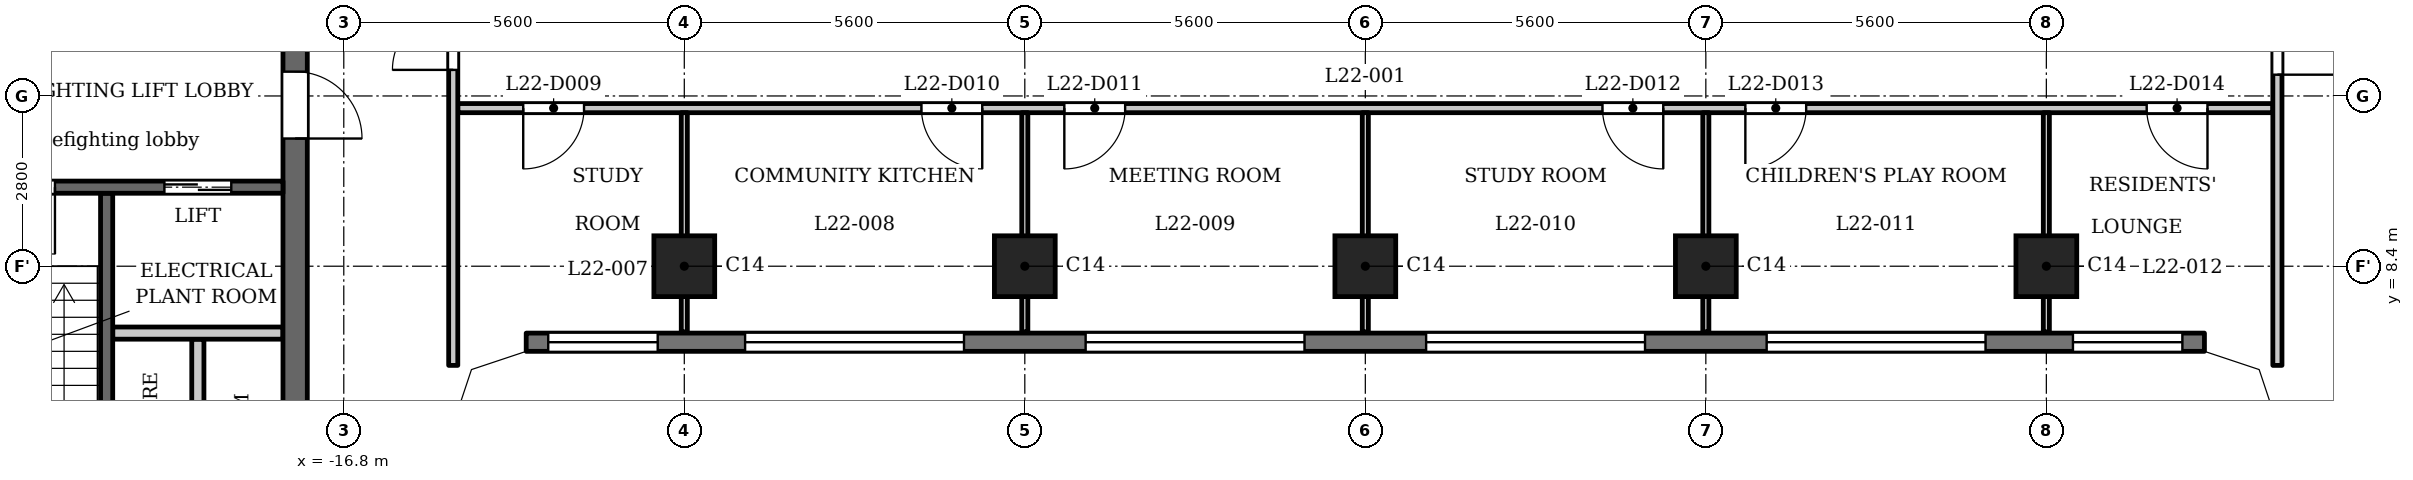
"""IFC4 building model, lengths in metres.
Left out: names, types, materials, properties, quantities, classifications, styles, units other than length and angle.
Written with IfcOpenShell. Run it as: python <this file> out.ifc"""

import sys

from ifc_helpers import new_model, si_unit, direction, frame, frame_2d, origin, origin_2d, place, context, subcontext, project, spatial, polyline, rectangle, outline, extrude, element, fill, save


model = new_model("IFC4")
c1 = context("Model", 3, precision=1e-05, world=origin(), true_north=direction((0.0, 1.0)))
c2 = subcontext(c1, "Body", "Model", "MODEL_VIEW")
j1 = project(units=[si_unit("LENGTHUNIT", "METRE"), si_unit("PLANEANGLEUNIT", "RADIAN")], contexts=[c1])
p1 = place(None, origin())
s1 = spatial("IfcSite", under=j1, at=p1, CompositionType="ELEMENT")
p2 = place(p1, origin())
s2 = spatial("IfcBuilding", under=s1, at=p2, CompositionType="ELEMENT")
p3 = place(p2, frame((0.0, 0.0, 90.3)))
s3 = spatial("IfcBuildingStorey", under=s2, at=p3, CompositionType="ELEMENT", Elevation=90.3)
for number, where, z_axis, x_axis in (
    (1, (-11.2, 8.4, 0.0), (0.0, 0.0, 1.0), (1.0, 0.0, 0.0)),
    (2, (-5.6, 8.4, 0.0), (0.0, 0.0, 1.0), (1.0, 0.0, 0.0)),
    (3, (0.0, 8.4, 0.0), (0.0, 0.0, 1.0), (1.0, 0.0, 0.0)),
    (4, (5.6, 8.4, 0.0), (0.0, 0.0, 1.0), (1.0, 0.0, 0.0)),
    (5, (11.2, 8.4, 0.0), (0.0, 0.0, 1.0), (1.0, 0.0, 0.0)),
):
    element("IfcColumn", number, at=place(p3, frame(where, z_axis=z_axis, x_axis=x_axis)), inside=s3, PredefinedType="COLUMN", context=c2, shape_type="SweptSolid", body=[
        extrude(rectangle(XDim=1.0, YDim=1.0, at=origin_2d()), origin(), (0.0, 0.0, 1.0), 3.5),
    ])
p4 = place(p3, frame((-13.8, 7.15, 0.0), z_axis=(0.0, 0.0, 1.0), x_axis=(1.0, 0.0, 0.0)))
e6 = element("IfcWall", 6, at=p4, inside=s3, PredefinedType="SOLIDWALL", context=c2, shape_type="SweptSolid", body=[
    extrude(rectangle(XDim=27.6, YDim=0.3, at=frame_2d((13.8, 0.0))), origin(), (0.0, 0.0, 1.0), 3.2),
])
p5 = place(p4, frame((0.363, 0.0, 0.9)))
e7 = element("IfcOpeningElement", 7, at=p5, cuts=e6, PredefinedType="OPENING", context=c2, shape_type="SweptSolid", body=[
    extrude(rectangle(XDim=1.8, YDim=1.25, at=frame_2d((0.9, 0.625))), frame((0.0, 0.16, 0.0), z_axis=(0.0, -1.0, 0.0), x_axis=(1.0, 0.0, 0.0)), (0.0, 0.0, 1.0), 0.32),
])
p6 = place(p4, frame((3.6, 0.0, 1.2)))
e8 = element("IfcOpeningElement", 8, at=p6, cuts=e6, PredefinedType="OPENING", context=c2, shape_type="SweptSolid", body=[
    extrude(rectangle(XDim=3.6, YDim=0.95, at=frame_2d((1.8, 0.475))), frame((0.0, 0.16, 0.0), z_axis=(0.0, -1.0, 0.0), x_axis=(1.0, 0.0, 0.0)), (0.0, 0.0, 1.0), 0.32),
])
p7 = place(p4, frame((9.2, 0.0, 1.2)))
e9 = element("IfcOpeningElement", 9, at=p7, cuts=e6, PredefinedType="OPENING", context=c2, shape_type="SweptSolid", body=[
    extrude(rectangle(XDim=3.6, YDim=0.95, at=frame_2d((1.8, 0.475))), frame((0.0, 0.16, 0.0), z_axis=(0.0, -1.0, 0.0), x_axis=(1.0, 0.0, 0.0)), (0.0, 0.0, 1.0), 0.32),
])
p8 = place(p4, frame((14.8, 0.0, 1.2)))
e10 = element("IfcOpeningElement", 10, at=p8, cuts=e6, PredefinedType="OPENING", context=c2, shape_type="SweptSolid", body=[
    extrude(rectangle(XDim=3.6, YDim=0.95, at=frame_2d((1.8, 0.475))), frame((0.0, 0.16, 0.0), z_axis=(0.0, -1.0, 0.0), x_axis=(1.0, 0.0, 0.0)), (0.0, 0.0, 1.0), 0.32),
])
p9 = place(p4, frame((20.4, 0.0, 1.2)))
e11 = element("IfcOpeningElement", 11, at=p9, cuts=e6, PredefinedType="OPENING", context=c2, shape_type="SweptSolid", body=[
    extrude(rectangle(XDim=3.6, YDim=0.95, at=frame_2d((1.8, 0.475))), frame((0.0, 0.16, 0.0), z_axis=(0.0, -1.0, 0.0), x_axis=(1.0, 0.0, 0.0)), (0.0, 0.0, 1.0), 0.32),
])
p10 = place(p4, frame((25.438, 0.0, 0.9)))
e12 = element("IfcOpeningElement", 12, at=p10, cuts=e6, PredefinedType="OPENING", context=c2, shape_type="SweptSolid", body=[
    extrude(rectangle(XDim=1.8, YDim=1.25, at=frame_2d((0.9, 0.625))), frame((0.0, 0.16, 0.0), z_axis=(0.0, -1.0, 0.0), x_axis=(1.0, 0.0, 0.0)), (0.0, 0.0, 1.0), 0.32),
])
p11 = place(p3, frame((-20.7, 2.6, 0.0), z_axis=(0.0, 0.0, 1.0), x_axis=(0.0, 1.0, 0.0)))
e13 = element("IfcWall", 13, at=p11, inside=s3, PredefinedType="SHEAR", context=c2, shape_type="SweptSolid", body=[
    extrude(rectangle(XDim=7.0, YDim=0.2, at=frame_2d((3.5, 0.0))), origin(), (0.0, 0.0, 1.0), 3.2),
])
p12 = place(p3, frame((-19.2, 2.6, 0.0), z_axis=(0.0, 0.0, 1.0), x_axis=(0.0, 1.0, 0.0)))
e14 = element("IfcWall", 14, at=p12, inside=s3, PredefinedType="PARTITIONING", context=c2, shape_type="SweptSolid", body=[
    extrude(rectangle(XDim=4.6, YDim=0.2, at=frame_2d((2.3, 0.0))), origin(), (0.0, 0.0, 1.0), 3.2),
])
p13 = place(p3, frame((-17.6, -12.3, 0.0), z_axis=(0.0, 0.0, 1.0), x_axis=(0.0, 1.0, 0.0)))
e15 = element("IfcWall", 15, at=p13, inside=s3, PredefinedType="SHEAR", context=c2, shape_type="SweptSolid", body=[
    extrude(rectangle(XDim=24.6, YDim=0.4, at=frame_2d((12.3, 0.0))), origin(), (0.0, 0.0, 1.0), 3.2),
])
p14 = place(p13, frame((6.0, 0.0, 0.0)))
e16 = element("IfcOpeningElement", 16, at=p14, cuts=e15, PredefinedType="OPENING", context=c2, shape_type="SweptSolid", body=[
    extrude(rectangle(XDim=1.1, YDim=2.1, at=frame_2d((0.55, 1.05))), frame((0.0, 0.21, 0.0), z_axis=(0.0, -1.0, 0.0), x_axis=(1.0, 0.0, 0.0)), (0.0, 0.0, 1.0), 0.42),
])
p15 = place(p13, frame((8.4, 0.0, 0.0)))
e17 = element("IfcOpeningElement", 17, at=p15, cuts=e15, PredefinedType="OPENING", context=c2, shape_type="SweptSolid", body=[
    extrude(rectangle(XDim=1.1, YDim=2.1, at=frame_2d((0.55, 1.05))), frame((0.0, 0.21, 0.0), z_axis=(0.0, -1.0, 0.0), x_axis=(1.0, 0.0, 0.0)), (0.0, 0.0, 1.0), 0.42),
])
p16 = place(p13, frame((10.8, 0.0, 0.0)))
e18 = element("IfcOpeningElement", 18, at=p16, cuts=e15, PredefinedType="OPENING", context=c2, shape_type="SweptSolid", body=[
    extrude(rectangle(XDim=1.1, YDim=2.1, at=frame_2d((0.55, 1.05))), frame((0.0, 0.21, 0.0), z_axis=(0.0, -1.0, 0.0), x_axis=(1.0, 0.0, 0.0)), (0.0, 0.0, 1.0), 0.42),
])
p17 = place(p13, frame((16.75, 0.0, 0.0)))
e19 = element("IfcOpeningElement", 19, at=p17, cuts=e15, PredefinedType="OPENING", context=c2, shape_type="SweptSolid", body=[
    extrude(rectangle(XDim=0.9, YDim=2.1, at=frame_2d((0.45, 1.05))), frame((0.0, 0.21, 0.0), z_axis=(0.0, -1.0, 0.0), x_axis=(1.0, 0.0, 0.0)), (0.0, 0.0, 1.0), 0.42),
])
p18 = place(p13, frame((22.8, 0.0, 0.0)))
e20 = element("IfcOpeningElement", 20, at=p18, cuts=e15, PredefinedType="OPENING", context=c2, shape_type="SweptSolid", body=[
    extrude(rectangle(XDim=1.1, YDim=2.1, at=frame_2d((0.55, 1.05))), frame((0.0, 0.21, 0.0), z_axis=(0.0, -1.0, 0.0), x_axis=(1.0, 0.0, 0.0)), (0.0, 0.0, 1.0), 0.42),
])
p19 = place(p13, frame((0.7, 0.0, 0.0)))
e21 = element("IfcOpeningElement", 21, at=p19, cuts=e15, PredefinedType="OPENING", context=c2, shape_type="SweptSolid", body=[
    extrude(rectangle(XDim=1.1, YDim=2.1, at=frame_2d((0.55, 1.05))), frame((0.0, 0.21, 0.0), z_axis=(0.0, -1.0, 0.0), x_axis=(1.0, 0.0, 0.0)), (0.0, 0.0, 1.0), 0.42),
])
p20 = place(p13, frame((12.775, 0.0, 0.0)))
e22 = element("IfcOpeningElement", 22, at=p20, cuts=e15, PredefinedType="OPENING", context=c2, shape_type="SweptSolid", body=[
    extrude(rectangle(XDim=1.8, YDim=2.1, at=frame_2d((0.9, 1.05))), frame((0.0, 0.21, 0.0), z_axis=(0.0, -1.0, 0.0), x_axis=(1.0, 0.0, 0.0)), (0.0, 0.0, 1.0), 0.42),
])
p21 = place(p3, frame((-17.8, 7.3, 0.0), z_axis=(0.0, 0.0, 1.0), x_axis=(-1.0, 0.0, 0.0)))
e23 = element("IfcWall", 23, at=p21, inside=s3, PredefinedType="PARTITIONING", context=c2, shape_type="SweptSolid", body=[
    extrude(rectangle(XDim=2.8, YDim=0.2, at=frame_2d((1.4, 0.0))), origin(), (0.0, 0.0, 1.0), 3.2),
])
p22 = place(p3, frame((-17.8, 9.7, 0.0), z_axis=(0.0, 0.0, 1.0), x_axis=(-1.0, 0.0, 0.0)))
e24 = element("IfcWall", 24, at=p22, inside=s3, PredefinedType="SHEAR", context=c2, shape_type="SweptSolid", body=[
    extrude(rectangle(XDim=8.3, YDim=0.2, at=frame_2d((4.15, 0.0))), origin(), (0.0, 0.0, 1.0), 3.2),
])
p23 = place(p22, frame((0.85, 0.0, 0.0)))
e25 = element("IfcOpeningElement", 25, at=p23, cuts=e24, PredefinedType="OPENING", context=c2, shape_type="SweptSolid", body=[
    extrude(rectangle(XDim=1.1, YDim=2.1, at=frame_2d((0.55, 1.05))), frame((0.0, 0.11, 0.0), z_axis=(0.0, -1.0, 0.0), x_axis=(1.0, 0.0, 0.0)), (0.0, 0.0, 1.0), 0.22),
])
p24 = place(p22, frame((3.75, 0.0, 0.0)))
e26 = element("IfcOpeningElement", 26, at=p24, cuts=e24, PredefinedType="OPENING", context=c2, shape_type="SweptSolid", body=[
    extrude(rectangle(XDim=1.1, YDim=2.1, at=frame_2d((0.55, 1.05))), frame((0.0, 0.11, 0.0), z_axis=(0.0, -1.0, 0.0), x_axis=(1.0, 0.0, 0.0)), (0.0, 0.0, 1.0), 0.22),
])
p25 = place(p3, frame((-14.925, 11.0, 0.0), z_axis=(0.0, 0.0, 1.0), x_axis=(1.0, 0.0, 0.0)))
e27 = element("IfcWall", 27, at=p25, inside=s3, PredefinedType="PARTITIONING", context=c2, shape_type="SweptSolid", body=[
    extrude(rectangle(XDim=29.85, YDim=0.15, at=frame_2d((14.925, 0.0))), origin(), (0.0, 0.0, 1.0), 3.2),
])
p26 = place(p25, frame((1.076, 0.0, 0.0)))
e28 = element("IfcOpeningElement", 28, at=p26, cuts=e27, PredefinedType="OPENING", context=c2, shape_type="SweptSolid", body=[
    extrude(rectangle(XDim=1.0, YDim=2.1, at=frame_2d((0.5, 1.05))), frame((0.0, 0.085, 0.0), z_axis=(0.0, -1.0, 0.0), x_axis=(1.0, 0.0, 0.0)), (0.0, 0.0, 1.0), 0.17),
])
p27 = place(p25, frame((7.625, 0.0, 0.0)))
e29 = element("IfcOpeningElement", 29, at=p27, cuts=e27, PredefinedType="OPENING", context=c2, shape_type="SweptSolid", body=[
    extrude(rectangle(XDim=1.0, YDim=2.1, at=frame_2d((0.5, 1.05))), frame((0.0, 0.085, 0.0), z_axis=(0.0, -1.0, 0.0), x_axis=(1.0, 0.0, 0.0)), (0.0, 0.0, 1.0), 0.17),
])
p28 = place(p25, frame((9.975, 0.0, 0.0)))
e30 = element("IfcOpeningElement", 30, at=p28, cuts=e27, PredefinedType="OPENING", context=c2, shape_type="SweptSolid", body=[
    extrude(rectangle(XDim=1.0, YDim=2.1, at=frame_2d((0.5, 1.05))), frame((0.0, 0.085, 0.0), z_axis=(0.0, -1.0, 0.0), x_axis=(1.0, 0.0, 0.0)), (0.0, 0.0, 1.0), 0.17),
])
p29 = place(p25, frame((18.825, 0.0, 0.0)))
e31 = element("IfcOpeningElement", 31, at=p29, cuts=e27, PredefinedType="OPENING", context=c2, shape_type="SweptSolid", body=[
    extrude(rectangle(XDim=1.0, YDim=2.1, at=frame_2d((0.5, 1.05))), frame((0.0, 0.085, 0.0), z_axis=(0.0, -1.0, 0.0), x_axis=(1.0, 0.0, 0.0)), (0.0, 0.0, 1.0), 0.17),
])
p30 = place(p25, frame((21.175, 0.0, 0.0)))
e32 = element("IfcOpeningElement", 32, at=p30, cuts=e27, PredefinedType="OPENING", context=c2, shape_type="SweptSolid", body=[
    extrude(rectangle(XDim=1.0, YDim=2.1, at=frame_2d((0.5, 1.05))), frame((0.0, 0.085, 0.0), z_axis=(0.0, -1.0, 0.0), x_axis=(1.0, 0.0, 0.0)), (0.0, 0.0, 1.0), 0.17),
])
p31 = place(p25, frame((27.775, 0.0, 0.0)))
e33 = element("IfcOpeningElement", 33, at=p31, cuts=e27, PredefinedType="OPENING", context=c2, shape_type="SweptSolid", body=[
    extrude(rectangle(XDim=1.0, YDim=2.1, at=frame_2d((0.5, 1.05))), frame((0.0, 0.085, 0.0), z_axis=(0.0, -1.0, 0.0), x_axis=(1.0, 0.0, 0.0)), (0.0, 0.0, 1.0), 0.17),
])
p32 = place(p3, frame((-15.0, 6.769, 0.0), z_axis=(0.0, 0.0, 1.0), x_axis=(0.0, 1.0, 0.0)))
e34 = element("IfcWall", 34, at=p32, inside=s3, PredefinedType="PARTITIONING", context=c2, shape_type="SweptSolid", body=[
    extrude(rectangle(XDim=6.356, YDim=0.15, at=frame_2d((3.178, 0.0))), origin(), (0.0, 0.0, 1.0), 3.2),
])
p33 = place(p32, frame((4.86, 0.0, 0.0)))
e35 = element("IfcOpeningElement", 35, at=p33, cuts=e34, PredefinedType="OPENING", context=c2, shape_type="SweptSolid", body=[
    extrude(rectangle(XDim=1.0, YDim=2.1, at=frame_2d((0.5, 1.05))), frame((0.0, 0.085, 0.0), z_axis=(0.0, -1.0, 0.0), x_axis=(1.0, 0.0, 0.0)), (0.0, 0.0, 1.0), 0.17),
])
for number, where, z_axis, x_axis in (
    (36, (-11.2, 7.32, 0.0), (0.0, 0.0, 1.0), (0.0, 1.0, 0.0)),
    (37, (-5.6, 7.32, 0.0), (0.0, 0.0, 1.0), (0.0, 1.0, 0.0)),
    (38, (0.0, 7.32, 0.0), (0.0, 0.0, 1.0), (0.0, 1.0, 0.0)),
    (39, (5.6, 7.32, 0.0), (0.0, 0.0, 1.0), (0.0, 1.0, 0.0)),
    (40, (11.2, 7.32, 0.0), (0.0, 0.0, 1.0), (0.0, 1.0, 0.0)),
):
    element("IfcWall", number, at=place(p3, frame(where, z_axis=z_axis, x_axis=x_axis)), inside=s3, PredefinedType="PARTITIONING", context=c2, shape_type="SweptSolid", body=[
        extrude(rectangle(XDim=3.605, YDim=0.1, at=frame_2d((1.802, 0.0))), origin(), (0.0, 0.0, 1.0), 3.2),
    ])
p34 = place(p3, frame((15.0, 6.769, 0.0), z_axis=(0.0, 0.0, 1.0), x_axis=(0.0, 1.0, 0.0)))
e41 = element("IfcWall", 41, at=p34, inside=s3, PredefinedType="PARTITIONING", context=c2, shape_type="SweptSolid", body=[
    extrude(rectangle(XDim=6.356, YDim=0.15, at=frame_2d((3.178, 0.0))), origin(), (0.0, 0.0, 1.0), 3.2),
])
p35 = place(p34, frame((4.781, 0.0, 0.0)))
e42 = element("IfcOpeningElement", 42, at=p35, cuts=e41, PredefinedType="OPENING", context=c2, shape_type="SweptSolid", body=[
    extrude(rectangle(XDim=1.0, YDim=2.1, at=frame_2d((0.5, 1.05))), frame((0.0, 0.085, 0.0), z_axis=(0.0, -1.0, 0.0), x_axis=(1.0, 0.0, 0.0)), (0.0, 0.0, 1.0), 0.17),
])
p36 = place(p3, origin())
e43 = element("IfcWall", 43, at=p36, inside=s3, PredefinedType="SOLIDWALL", context=c2, shape_type="SweptSolid", body=[
    extrude(outline(polyline([(-13.849, 7.3), (-14.937, 6.937), (-15.3, 5.849), (-15.3, 5.8), (-15.0, 5.8), (-14.7, 6.7), (-13.8, 7.0), (-13.8, 7.3), (-13.849, 7.3)])), origin(), (0.0, 0.0, 1.0), 3.2),
])
e44 = element("IfcWall", 44, at=p36, inside=s3, PredefinedType="SOLIDWALL", context=c2, shape_type="SweptSolid", body=[
    extrude(outline(polyline([(14.937, 6.937), (13.849, 7.3), (13.8, 7.3), (13.8, 7.0), (14.7, 6.7), (15.0, 5.8), (15.3, 5.8), (15.3, 5.849), (14.937, 6.937)])), origin(), (0.0, 0.0, 1.0), 3.2),
])
p37 = place(p23, origin())
e45 = element("IfcDoor", 45, at=p37, inside=s3, OperationType="DOUBLE_DOOR_SLIDING", PredefinedType="DOOR", context=c2, shape_type="SweptSolid", body=[
    extrude(rectangle(XDim=1.1, YDim=2.1, at=frame_2d((0.55, 1.05))), frame((0.0, 0.025, 0.0), z_axis=(0.0, -1.0, 0.0), x_axis=(1.0, 0.0, 0.0)), (0.0, 0.0, 1.0), 0.05),
])
fill(e25, e45)
p38 = place(p18, origin())
e46 = element("IfcDoor", 46, at=p38, inside=s3, OperationType="SINGLE_SWING_LEFT", PredefinedType="DOOR", context=c2, shape_type="SweptSolid", body=[
    extrude(rectangle(XDim=1.1, YDim=2.1, at=frame_2d((0.55, 1.05))), frame((0.0, 0.025, 0.0), z_axis=(0.0, -1.0, 0.0), x_axis=(1.0, 0.0, 0.0)), (0.0, 0.0, 1.0), 0.05),
])
fill(e20, e46)
p39 = place(p24, origin())
e47 = element("IfcDoor", 47, at=p39, inside=s3, OperationType="SINGLE_SWING_RIGHT", PredefinedType="DOOR", context=c2, shape_type="SweptSolid", body=[
    extrude(rectangle(XDim=1.1, YDim=2.1, at=frame_2d((0.55, 1.05))), frame((0.0, 0.025, 0.0), z_axis=(0.0, -1.0, 0.0), x_axis=(1.0, 0.0, 0.0)), (0.0, 0.0, 1.0), 0.05),
])
fill(e26, e47)
p40 = place(p33, origin())
e48 = element("IfcDoor", 48, at=p40, inside=s3, OperationType="SINGLE_SWING_RIGHT", PredefinedType="DOOR", context=c2, shape_type="SweptSolid", body=[
    extrude(rectangle(XDim=1.0, YDim=2.1, at=frame_2d((0.5, 1.05))), frame((0.0, 0.025, 0.0), z_axis=(0.0, -1.0, 0.0), x_axis=(1.0, 0.0, 0.0)), (0.0, 0.0, 1.0), 0.05),
])
fill(e35, e48)
p41 = place(p35, origin())
e49 = element("IfcDoor", 49, at=p41, inside=s3, OperationType="SINGLE_SWING_LEFT", PredefinedType="DOOR", context=c2, shape_type="SweptSolid", body=[
    extrude(rectangle(XDim=1.0, YDim=2.1, at=frame_2d((0.5, 1.05))), frame((0.0, 0.025, 0.0), z_axis=(0.0, -1.0, 0.0), x_axis=(1.0, 0.0, 0.0)), (0.0, 0.0, 1.0), 0.05),
])
fill(e42, e49)
p42 = place(p26, origin())
e50 = element("IfcDoor", 50, at=p42, inside=s3, OperationType="SINGLE_SWING_LEFT", PredefinedType="DOOR", context=c2, shape_type="SweptSolid", body=[
    extrude(rectangle(XDim=1.0, YDim=2.1, at=frame_2d((0.5, 1.05))), frame((0.0, 0.025, 0.0), z_axis=(0.0, -1.0, 0.0), x_axis=(1.0, 0.0, 0.0)), (0.0, 0.0, 1.0), 0.05),
])
fill(e28, e50)
p43 = place(p27, origin())
e51 = element("IfcDoor", 51, at=p43, inside=s3, OperationType="SINGLE_SWING_RIGHT", PredefinedType="DOOR", context=c2, shape_type="SweptSolid", body=[
    extrude(rectangle(XDim=1.0, YDim=2.1, at=frame_2d((0.5, 1.05))), frame((0.0, 0.025, 0.0), z_axis=(0.0, -1.0, 0.0), x_axis=(1.0, 0.0, 0.0)), (0.0, 0.0, 1.0), 0.05),
])
fill(e29, e51)
p44 = place(p28, origin())
e52 = element("IfcDoor", 52, at=p44, inside=s3, OperationType="SINGLE_SWING_LEFT", PredefinedType="DOOR", context=c2, shape_type="SweptSolid", body=[
    extrude(rectangle(XDim=1.0, YDim=2.1, at=frame_2d((0.5, 1.05))), frame((0.0, 0.025, 0.0), z_axis=(0.0, -1.0, 0.0), x_axis=(1.0, 0.0, 0.0)), (0.0, 0.0, 1.0), 0.05),
])
fill(e30, e52)
p45 = place(p29, origin())
e53 = element("IfcDoor", 53, at=p45, inside=s3, OperationType="SINGLE_SWING_RIGHT", PredefinedType="DOOR", context=c2, shape_type="SweptSolid", body=[
    extrude(rectangle(XDim=1.0, YDim=2.1, at=frame_2d((0.5, 1.05))), frame((0.0, 0.025, 0.0), z_axis=(0.0, -1.0, 0.0), x_axis=(1.0, 0.0, 0.0)), (0.0, 0.0, 1.0), 0.05),
])
fill(e31, e53)
p46 = place(p30, origin())
e54 = element("IfcDoor", 54, at=p46, inside=s3, OperationType="SINGLE_SWING_LEFT", PredefinedType="DOOR", context=c2, shape_type="SweptSolid", body=[
    extrude(rectangle(XDim=1.0, YDim=2.1, at=frame_2d((0.5, 1.05))), frame((0.0, 0.025, 0.0), z_axis=(0.0, -1.0, 0.0), x_axis=(1.0, 0.0, 0.0)), (0.0, 0.0, 1.0), 0.05),
])
fill(e32, e54)
p47 = place(p31, origin())
e55 = element("IfcDoor", 55, at=p47, inside=s3, OperationType="SINGLE_SWING_RIGHT", PredefinedType="DOOR", context=c2, shape_type="SweptSolid", body=[
    extrude(rectangle(XDim=1.0, YDim=2.1, at=frame_2d((0.5, 1.05))), frame((0.0, 0.025, 0.0), z_axis=(0.0, -1.0, 0.0), x_axis=(1.0, 0.0, 0.0)), (0.0, 0.0, 1.0), 0.05),
])
fill(e33, e55)
p48 = place(p5, origin())
e56 = element("IfcWindow", 56, at=p48, inside=s3, PartitioningType="SINGLE_PANEL", PredefinedType="WINDOW", context=c2, shape_type="SweptSolid", body=[
    extrude(rectangle(XDim=1.8, YDim=1.25, at=frame_2d((0.9, 0.625))), frame((0.0, 0.03, 0.0), z_axis=(0.0, -1.0, 0.0), x_axis=(1.0, 0.0, 0.0)), (0.0, 0.0, 1.0), 0.06),
])
fill(e7, e56)
p49 = place(p6, origin())
e57 = element("IfcWindow", 57, at=p49, inside=s3, PartitioningType="SINGLE_PANEL", PredefinedType="WINDOW", context=c2, shape_type="SweptSolid", body=[
    extrude(rectangle(XDim=3.6, YDim=0.95, at=frame_2d((1.8, 0.475))), frame((0.0, 0.03, 0.0), z_axis=(0.0, -1.0, 0.0), x_axis=(1.0, 0.0, 0.0)), (0.0, 0.0, 1.0), 0.06),
])
fill(e8, e57)
p50 = place(p7, origin())
e58 = element("IfcWindow", 58, at=p50, inside=s3, PartitioningType="SINGLE_PANEL", PredefinedType="WINDOW", context=c2, shape_type="SweptSolid", body=[
    extrude(rectangle(XDim=3.6, YDim=0.95, at=frame_2d((1.8, 0.475))), frame((0.0, 0.03, 0.0), z_axis=(0.0, -1.0, 0.0), x_axis=(1.0, 0.0, 0.0)), (0.0, 0.0, 1.0), 0.06),
])
fill(e9, e58)
p51 = place(p8, origin())
e59 = element("IfcWindow", 59, at=p51, inside=s3, PartitioningType="SINGLE_PANEL", PredefinedType="WINDOW", context=c2, shape_type="SweptSolid", body=[
    extrude(rectangle(XDim=3.6, YDim=0.95, at=frame_2d((1.8, 0.475))), frame((0.0, 0.03, 0.0), z_axis=(0.0, -1.0, 0.0), x_axis=(1.0, 0.0, 0.0)), (0.0, 0.0, 1.0), 0.06),
])
fill(e10, e59)
p52 = place(p9, origin())
e60 = element("IfcWindow", 60, at=p52, inside=s3, PartitioningType="SINGLE_PANEL", PredefinedType="WINDOW", context=c2, shape_type="SweptSolid", body=[
    extrude(rectangle(XDim=3.6, YDim=0.95, at=frame_2d((1.8, 0.475))), frame((0.0, 0.03, 0.0), z_axis=(0.0, -1.0, 0.0), x_axis=(1.0, 0.0, 0.0)), (0.0, 0.0, 1.0), 0.06),
])
fill(e11, e60)
p53 = place(p10, origin())
e61 = element("IfcWindow", 61, at=p53, inside=s3, PartitioningType="SINGLE_PANEL", PredefinedType="WINDOW", context=c2, shape_type="SweptSolid", body=[
    extrude(rectangle(XDim=1.8, YDim=1.25, at=frame_2d((0.9, 0.625))), frame((0.0, 0.03, 0.0), z_axis=(0.0, -1.0, 0.0), x_axis=(1.0, 0.0, 0.0)), (0.0, 0.0, 1.0), 0.06),
])
fill(e12, e61)
save(model, sys.argv[1])
